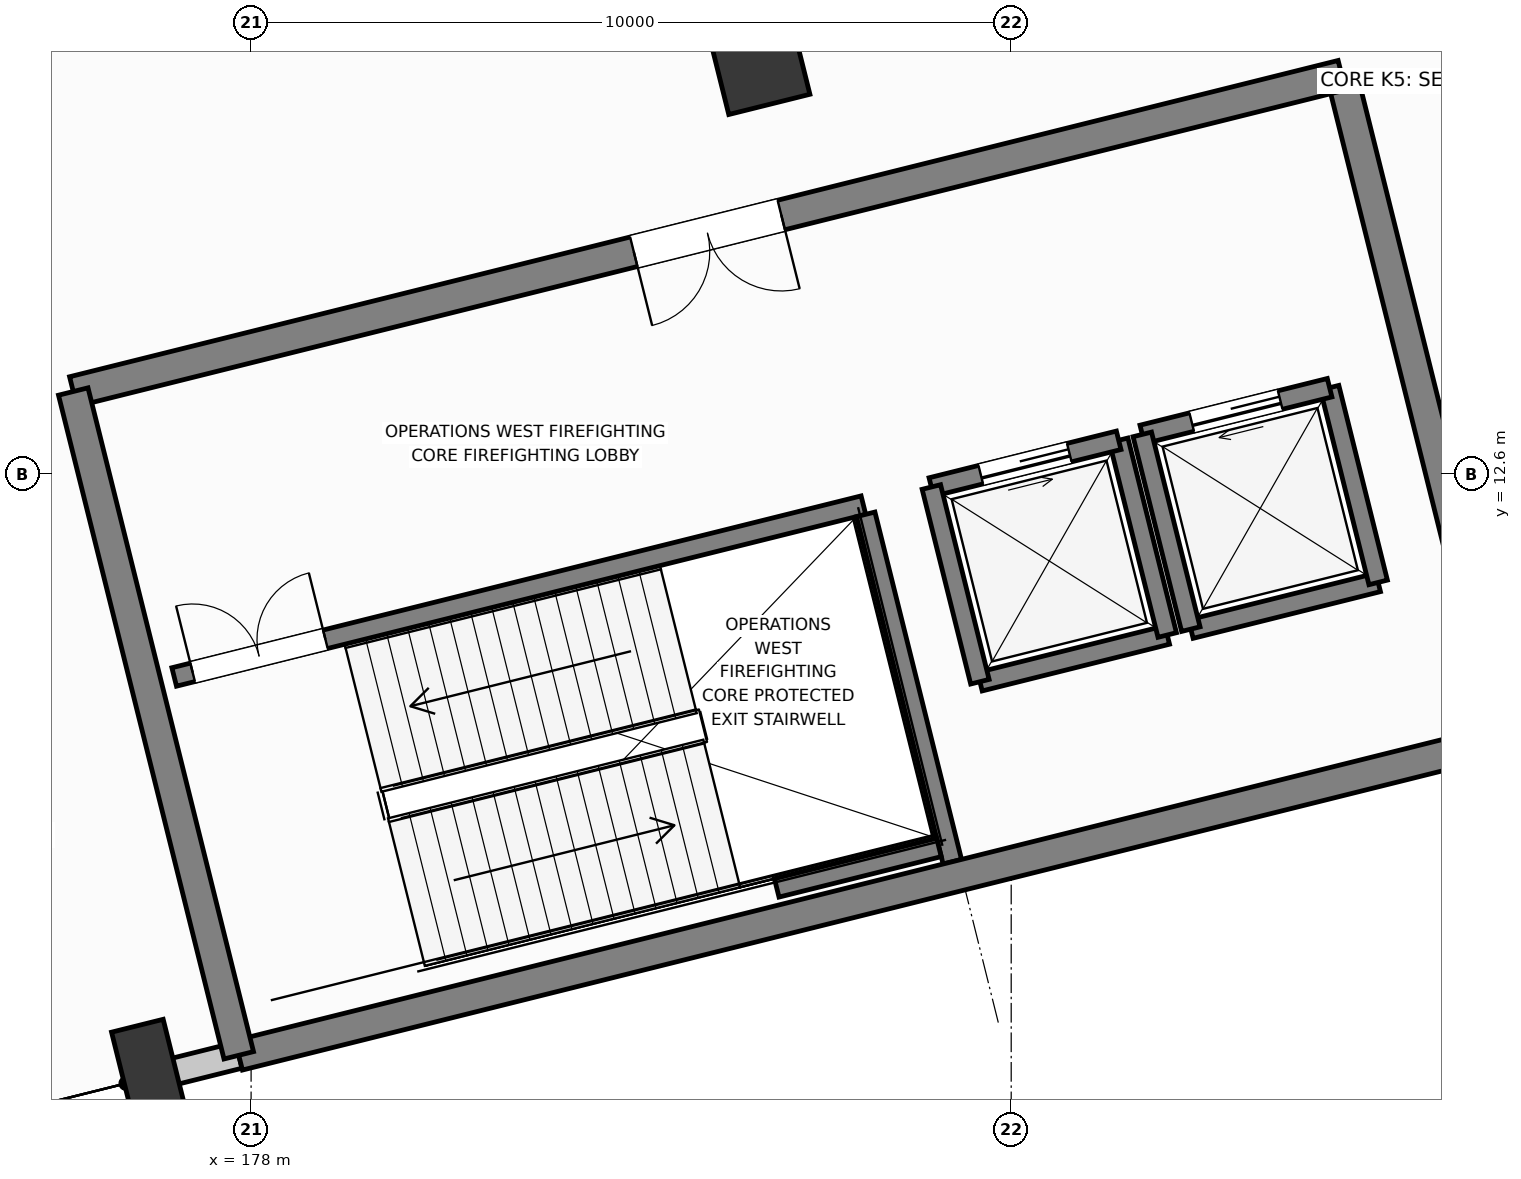
"""IFC4 building model, lengths in metres.
Left out: names, types, materials, properties, quantities, classifications, styles, units other than length and angle.
Written with IfcOpenShell. Run it as: python <this file> out.ifc"""

import sys

from ifc_helpers import new_model, si_unit, direction, frame, frame_2d, origin, origin_2d, place, context, subcontext, project, spatial, rectangle, extrude, element, fill, save


model = new_model("IFC4")
c1 = context("Model", 3, precision=1e-05, world=origin(), true_north=direction((0.0, 1.0)))
c2 = subcontext(c1, "Body", "Model", "MODEL_VIEW")
j1 = project(units=[si_unit("LENGTHUNIT", "METRE"), si_unit("PLANEANGLEUNIT", "RADIAN")], contexts=[c1])
p1 = place(None, origin())
s1 = spatial("IfcSite", under=j1, at=p1, CompositionType="ELEMENT")
p2 = place(p1, origin())
s2 = spatial("IfcBuilding", under=s1, at=p2, CompositionType="ELEMENT")
p3 = place(p2, frame((0.0, 0.0, 6.0)))
s3 = spatial("IfcBuildingStorey", under=s2, at=p3, CompositionType="ELEMENT", Elevation=6.0)
p4 = place(p3, frame((176.673, 4.661, 0.0), z_axis=(0.0, 0.0, 1.0), x_axis=(0.970295726276, 0.2419218956, 0.0)))
e1 = element("IfcColumn", 1, at=p4, inside=s3, PredefinedType="COLUMN", context=c2, shape_type="SweptSolid", body=[
    extrude(rectangle(XDim=0.7, YDim=1.4, at=origin_2d()), origin(), (0.0, 0.0, 1.0), 5.4),
])
p5 = place(p3, frame((184.685, 17.995, 0.0), z_axis=(0.0, 0.0, 1.0), x_axis=(0.970295726276, 0.2419218956, 0.0)))
e2 = element("IfcColumn", 2, at=p5, inside=s3, PredefinedType="COLUMN", context=c2, shape_type="SweptSolid", body=[
    extrude(rectangle(XDim=1.1, YDim=1.1, at=origin_2d()), origin(), (0.0, 0.0, 1.0), 5.4),
])
p6 = place(p3, frame((176.673, 4.661, 0.0), z_axis=(0.0, 0.0, 1.0), x_axis=(0.970294277425, 0.24192770655, 0.0)))
e3 = element("IfcWall", 3, at=p6, inside=s3, PredefinedType="STANDARD", context=c2, shape_type="SweptSolid", body=[
    extrude(rectangle(XDim=1.2, YDim=0.35, at=frame_2d((0.6, 0.0))), origin(), (0.0, 0.0, 1.0), 5.035),
])
p7 = place(p3, frame((187.588, 9.866, 0.0), z_axis=(0.0, 0.0, 1.0), x_axis=(0.97029284861, 0.241933436994, 0.0)))
e4 = element("IfcWall", 4, at=p7, inside=s3, PredefinedType="SOLIDWALL", context=c2, shape_type="SweptSolid", body=[
    extrude(rectangle(XDim=2.54, YDim=0.25, at=frame_2d((1.27, 0.0))), origin(), (0.0, 0.0, 1.0), 5.05),
])
p8 = place(p3, frame((190.053, 10.481, 0.0), z_axis=(0.0, 0.0, 1.0), x_axis=(-0.241938414856, 0.970291607413, 0.0)))
e5 = element("IfcWall", 5, at=p8, inside=s3, PredefinedType="SOLIDWALL", context=c2, shape_type="SweptSolid", body=[
    extrude(rectangle(XDim=2.64, YDim=0.25, at=frame_2d((1.32, 0.0))), origin(), (0.0, 0.0, 1.0), 5.05),
])
p9 = place(p3, frame((189.414, 13.042, 0.0), z_axis=(0.0, 0.0, 1.0), x_axis=(-0.97029284861, -0.241933436994, 0.0)))
e6 = element("IfcWall", 6, at=p9, inside=s3, PredefinedType="SOLIDWALL", context=c2, shape_type="SweptSolid", body=[
    extrude(rectangle(XDim=2.54, YDim=0.25, at=frame_2d((1.27, 0.0))), origin(), (0.0, 0.0, 1.0), 5.05),
])
p10 = place(p9, frame((0.67, 0.0, 0.0)))
e7 = element("IfcOpeningElement", 7, at=p10, cuts=e6, PredefinedType="OPENING", context=c2, shape_type="SweptSolid", body=[
    extrude(rectangle(XDim=1.2, YDim=2.2, at=frame_2d((0.6, 1.1))), frame((0.0, 0.135, 0.0), z_axis=(0.0, -1.0, 0.0), x_axis=(1.0, 0.0, 0.0)), (0.0, 0.0, 1.0), 0.27),
])
p11 = place(p3, frame((186.95, 12.428, 0.0), z_axis=(0.0, 0.0, 1.0), x_axis=(0.241938414856, -0.970291607413, 0.0)))
e8 = element("IfcWall", 8, at=p11, inside=s3, PredefinedType="SOLIDWALL", context=c2, shape_type="SweptSolid", body=[
    extrude(rectangle(XDim=2.64, YDim=0.25, at=frame_2d((1.32, 0.0))), origin(), (0.0, 0.0, 1.0), 5.05),
])
p12 = place(p3, frame((190.363, 10.558, 0.0), z_axis=(0.0, 0.0, 1.0), x_axis=(0.97029284861, 0.241933436994, 0.0)))
e9 = element("IfcWall", 9, at=p12, inside=s3, PredefinedType="SOLIDWALL", context=c2, shape_type="SweptSolid", body=[
    extrude(rectangle(XDim=2.54, YDim=0.25, at=frame_2d((1.27, 0.0))), origin(), (0.0, 0.0, 1.0), 5.05),
])
p13 = place(p3, frame((192.828, 11.173, 0.0), z_axis=(0.0, 0.0, 1.0), x_axis=(-0.241938414856, 0.970291607413, 0.0)))
e10 = element("IfcWall", 10, at=p13, inside=s3, PredefinedType="SOLIDWALL", context=c2, shape_type="SweptSolid", body=[
    extrude(rectangle(XDim=2.64, YDim=0.25, at=frame_2d((1.32, 0.0))), origin(), (0.0, 0.0, 1.0), 5.05),
])
p14 = place(p3, frame((192.189, 13.734, 0.0), z_axis=(0.0, 0.0, 1.0), x_axis=(-0.97029284861, -0.241933436994, 0.0)))
e11 = element("IfcWall", 11, at=p14, inside=s3, PredefinedType="SOLIDWALL", context=c2, shape_type="SweptSolid", body=[
    extrude(rectangle(XDim=2.54, YDim=0.25, at=frame_2d((1.27, 0.0))), origin(), (0.0, 0.0, 1.0), 5.05),
])
p15 = place(p14, frame((0.67, 0.0, 0.0)))
e12 = element("IfcOpeningElement", 12, at=p15, cuts=e11, PredefinedType="OPENING", context=c2, shape_type="SweptSolid", body=[
    extrude(rectangle(XDim=1.2, YDim=2.2, at=frame_2d((0.6, 1.1))), frame((0.0, 0.135, 0.0), z_axis=(0.0, -1.0, 0.0), x_axis=(1.0, 0.0, 0.0)), (0.0, 0.0, 1.0), 0.27),
])
p16 = place(p3, frame((189.725, 13.12, 0.0), z_axis=(0.0, 0.0, 1.0), x_axis=(0.241938414856, -0.970291607413, 0.0)))
e13 = element("IfcWall", 13, at=p16, inside=s3, PredefinedType="SOLIDWALL", context=c2, shape_type="SweptSolid", body=[
    extrude(rectangle(XDim=2.64, YDim=0.25, at=frame_2d((1.32, 0.0))), origin(), (0.0, 0.0, 1.0), 5.05),
])
p17 = place(p3, frame((176.988, 9.929, 0.0), z_axis=(0.0, 0.0, 1.0), x_axis=(0.970297151331, 0.241916179943, 0.0)))
e14 = element("IfcWall", 14, at=p17, inside=s3, PredefinedType="SOLIDWALL", context=c2, shape_type="SweptSolid", body=[
    extrude(rectangle(XDim=9.345, YDim=0.25, at=frame_2d((4.673, 0.0))), origin(), (0.0, 0.0, 1.0), 5.03),
])
p18 = place(p17, frame((0.25, 0.0, 0.0)))
e15 = element("IfcOpeningElement", 15, at=p18, cuts=e14, PredefinedType="OPENING", context=c2, shape_type="SweptSolid", body=[
    extrude(rectangle(XDim=1.8, YDim=2.25, at=frame_2d((0.9, 1.125))), frame((0.0, 0.135, 0.0), z_axis=(0.0, -1.0, 0.0), x_axis=(1.0, 0.0, 0.0)), (0.0, 0.0, 1.0), 0.27),
])
p19 = place(p3, frame((187.225, 7.498, 0.0), z_axis=(0.0, 0.0, 1.0), x_axis=(-0.241911120435, 0.970298412763, 0.0)))
e16 = element("IfcWall", 16, at=p19, inside=s3, PredefinedType="SOLIDWALL", context=c2, shape_type="SweptSolid", body=[
    extrude(rectangle(XDim=4.71, YDim=0.25, at=frame_2d((2.355, 0.0))), origin(), (0.0, 0.0, 1.0), 5.03),
])
p20 = place(p3, frame((184.915, 7.154, 0.0), z_axis=(0.0, 0.0, 1.0), x_axis=(0.97029738597, 0.241915238833, 0.0)))
e17 = element("IfcWall", 17, at=p20, inside=s3, PredefinedType="SOLIDWALL", context=c2, shape_type="SweptSolid", body=[
    extrude(rectangle(XDim=2.2, YDim=0.25, at=frame_2d((1.1, 0.0))), origin(), (0.0, 0.0, 1.0), 5.03),
])
p21 = place(p3, frame((177.838, 4.951, 0.0), z_axis=(0.0, 0.0, 1.0), x_axis=(0.970295179998, 0.241924086589, 0.0)))
e18 = element("IfcWall", 18, at=p21, inside=s3, PredefinedType="SHEAR", context=c2, shape_type="SweptSolid", body=[
    extrude(rectangle(XDim=17.2, YDim=0.4, at=frame_2d((8.6, 0.0))), origin(), (0.0, 0.0, 1.0), 5.05),
])
p22 = place(p3, frame((194.527, 9.113, 0.0), z_axis=(0.0, 0.0, 1.0), x_axis=(-0.241923808098, 0.970295249435, 0.0)))
e19 = element("IfcWall", 19, at=p22, inside=s3, PredefinedType="SHEAR", context=c2, shape_type="SweptSolid", body=[
    extrude(rectangle(XDim=9.0, YDim=0.4, at=frame_2d((4.5, 0.0))), origin(), (0.0, 0.0, 1.0), 5.05),
])
p23 = place(p3, frame((192.349, 17.845, 0.0), z_axis=(0.0, 0.0, 1.0), x_axis=(-0.970296544738, -0.241918612906, 0.0)))
e20 = element("IfcWall", 20, at=p23, inside=s3, PredefinedType="SHEAR", context=c2, shape_type="SweptSolid", body=[
    extrude(rectangle(XDim=17.2, YDim=0.4, at=frame_2d((8.6, 0.0))), origin(), (0.0, 0.0, 1.0), 5.05),
])
p24 = place(p23, frame((7.6, 0.0, 0.0)))
e21 = element("IfcOpeningElement", 21, at=p24, cuts=e20, PredefinedType="OPENING", context=c2, shape_type="SweptSolid", body=[
    extrude(rectangle(XDim=2.0, YDim=2.3, at=frame_2d((1.0, 1.15))), frame((0.0, 0.21, 0.0), z_axis=(0.0, -1.0, 0.0), x_axis=(1.0, 0.0, 0.0)), (0.0, 0.0, 1.0), 0.42),
])
p25 = place(p3, frame((175.66, 13.684, 0.0), z_axis=(0.0, 0.0, 1.0), x_axis=(0.241921199913, -0.97029589973, 0.0)))
e22 = element("IfcWall", 22, at=p25, inside=s3, PredefinedType="SHEAR", context=c2, shape_type="SweptSolid", body=[
    extrude(rectangle(XDim=9.0, YDim=0.4, at=frame_2d((4.5, 0.0))), origin(), (0.0, 0.0, 1.0), 5.05),
])
p26 = place(p3, frame((190.898, 24.492, 0.0), z_axis=(0.0, 0.0, 1.0), x_axis=(-0.97029524823, -0.241923812931, 0.0)))
e23 = element("IfcWall", 23, at=p26, inside=s3, PredefinedType="PARTITIONING", context=c2, shape_type="SweptSolid", body=[
    extrude(rectangle(XDim=29.0, YDim=0.16, at=frame_2d((14.5, 0.0))), origin(), (0.0, 0.0, 1.0), 3.975),
])
p27 = place(p26, frame((13.6, 0.0, 0.0)))
e24 = element("IfcOpeningElement", 24, at=p27, cuts=e23, PredefinedType="OPENING", context=c2, shape_type="SweptSolid", body=[
    extrude(rectangle(XDim=1.8, YDim=2.25, at=frame_2d((0.9, 1.125))), frame((0.0, 0.09, 0.0), z_axis=(0.0, -1.0, 0.0), x_axis=(1.0, 0.0, 0.0)), (0.0, 0.0, 1.0), 0.18),
])
p28 = place(p10, origin())
e25 = element("IfcDoor", 25, at=p28, inside=s3, OperationType="SLIDING_TO_LEFT", PredefinedType="DOOR", context=c2, shape_type="SweptSolid", body=[
    extrude(rectangle(XDim=1.2, YDim=2.2, at=frame_2d((0.6, 1.1))), frame((0.0, 0.025, 0.0), z_axis=(0.0, -1.0, 0.0), x_axis=(1.0, 0.0, 0.0)), (0.0, 0.0, 1.0), 0.05),
])
fill(e7, e25)
p29 = place(p15, origin())
e26 = element("IfcDoor", 26, at=p29, inside=s3, OperationType="SLIDING_TO_RIGHT", PredefinedType="DOOR", context=c2, shape_type="SweptSolid", body=[
    extrude(rectangle(XDim=1.2, YDim=2.2, at=frame_2d((0.6, 1.1))), frame((0.0, 0.025, 0.0), z_axis=(0.0, -1.0, 0.0), x_axis=(1.0, 0.0, 0.0)), (0.0, 0.0, 1.0), 0.05),
])
fill(e12, e26)
p30 = place(p18, origin())
e27 = element("IfcDoor", 27, at=p30, inside=s3, OperationType="DOUBLE_DOOR_SINGLE_SWING", PredefinedType="DOOR", context=c2, shape_type="SweptSolid", body=[
    extrude(rectangle(XDim=1.8, YDim=2.25, at=frame_2d((0.9, 1.125))), frame((0.0, 0.025, 0.0), z_axis=(0.0, -1.0, 0.0), x_axis=(1.0, 0.0, 0.0)), (0.0, 0.0, 1.0), 0.05),
])
fill(e15, e27)
p31 = place(p24, origin())
e28 = element("IfcDoor", 28, at=p31, inside=s3, OperationType="DOUBLE_DOOR_SINGLE_SWING", PredefinedType="DOOR", context=c2, shape_type="SweptSolid", body=[
    extrude(rectangle(XDim=2.0, YDim=2.3, at=frame_2d((1.0, 1.15))), frame((0.0, 0.025, 0.0), z_axis=(0.0, -1.0, 0.0), x_axis=(1.0, 0.0, 0.0)), (0.0, 0.0, 1.0), 0.05),
])
fill(e21, e28)
save(model, sys.argv[1])
